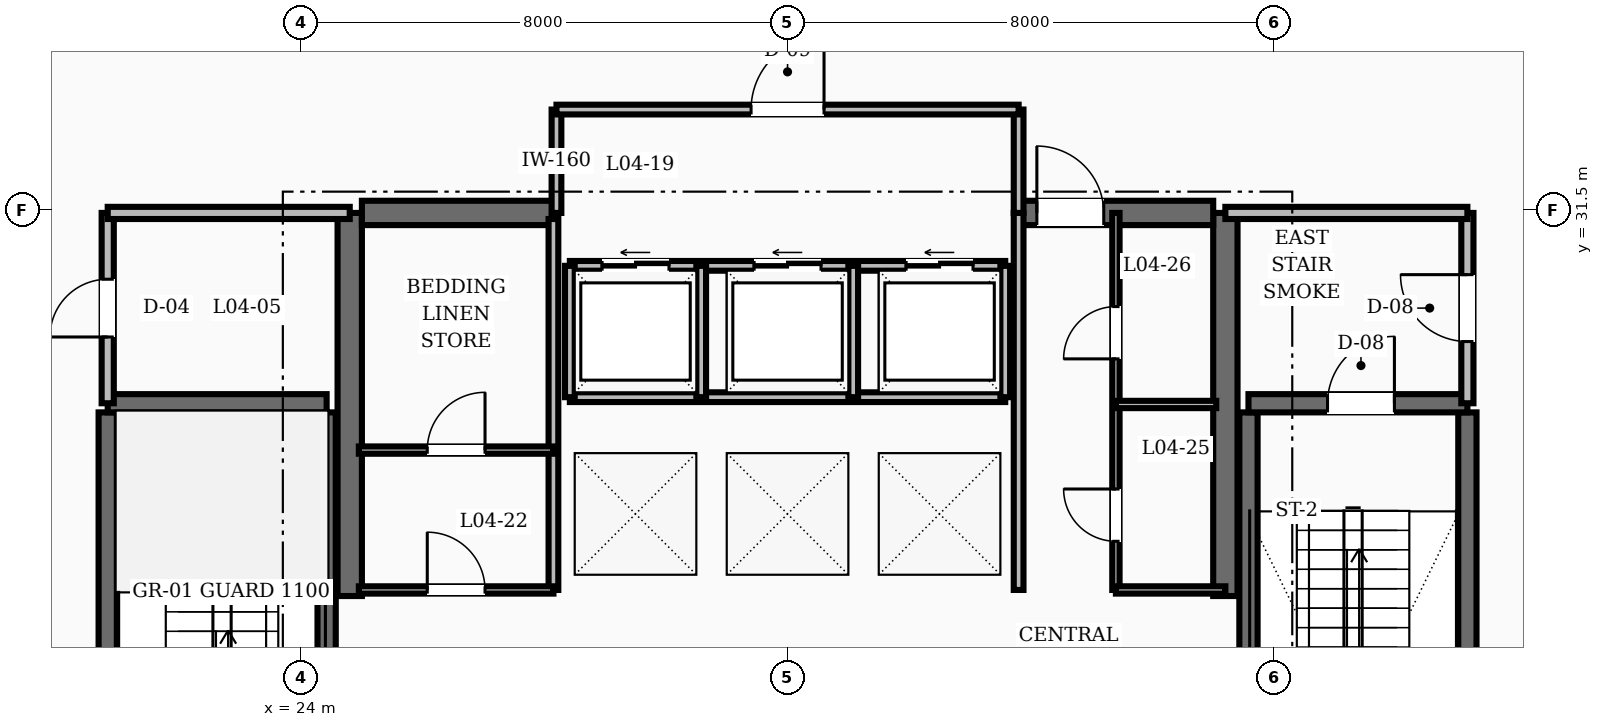
"""IFC4 building model, lengths in metres.
Left out: names, types, materials, properties, quantities, classifications, styles, units other than length and angle.
Written with IfcOpenShell. Run it as: python <this file> out.ifc"""

import sys

from ifc_helpers import new_model, si_unit, direction, frame, frame_2d, origin, place, context, subcontext, project, spatial, rectangle, extrude, element, fill, save


model = new_model("IFC4")
c1 = context("Model", 3, precision=1e-05, world=origin(), true_north=direction((0.0, 1.0)))
c2 = subcontext(c1, "Body", "Model", "MODEL_VIEW")
j1 = project(units=[si_unit("LENGTHUNIT", "METRE"), si_unit("PLANEANGLEUNIT", "RADIAN")], contexts=[c1])
p1 = place(None, origin())
s1 = spatial("IfcSite", under=j1, at=p1, CompositionType="ELEMENT")
p2 = place(p1, origin())
s2 = spatial("IfcBuilding", under=s1, at=p2, CompositionType="ELEMENT")
p3 = place(p2, frame((0.0, 0.0, 19.6)))
s3 = spatial("IfcBuildingStorey", under=s2, at=p3, CompositionType="ELEMENT", Elevation=19.6)
for number, where, z_axis, x_axis in (
    (1, (24.8, 25.15, 0.0), (0.0, 0.0, 1.0), (0.0, 1.0, 0.0)),
    (2, (39.2, 25.15, 0.0), (0.0, 0.0, 1.0), (0.0, 1.0, 0.0)),
):
    element("IfcWall", number, at=place(p3, frame(where, z_axis=z_axis, x_axis=x_axis)), inside=s3, PredefinedType="SHEAR", context=c2, shape_type="SweptSolid", body=[
        extrude(rectangle(XDim=6.3, YDim=0.4, at=frame_2d((3.15, 0.0))), origin(), (0.0, 0.0, 1.0), 4.8),
    ])
p4 = place(p3, frame((25.0, 31.45, 0.0), z_axis=(0.0, 0.0, 1.0), x_axis=(1.0, 0.0, 0.0)))
e3 = element("IfcWall", 3, at=p4, inside=s3, PredefinedType="SHEAR", context=c2, shape_type="SweptSolid", body=[
    extrude(rectangle(XDim=3.2, YDim=0.4, at=frame_2d((1.6, 0.0))), origin(), (0.0, 0.0, 1.0), 4.8),
])
p5 = place(p3, frame((35.8, 31.45, 0.0), z_axis=(0.0, 0.0, 1.0), x_axis=(1.0, 0.0, 0.0)))
e4 = element("IfcWall", 4, at=p5, inside=s3, PredefinedType="SHEAR", context=c2, shape_type="SweptSolid", body=[
    extrude(rectangle(XDim=3.2, YDim=0.4, at=frame_2d((1.6, 0.0))), origin(), (0.0, 0.0, 1.0), 4.8),
])
p6 = place(p5, frame((0.3, 0.0, 0.0)))
e5 = element("IfcOpeningElement", 5, at=p6, cuts=e4, PredefinedType="OPENING", context=c2, shape_type="SweptSolid", body=[
    extrude(rectangle(XDim=1.1, YDim=2.1, at=frame_2d((0.55, 1.05))), frame((0.0, 0.21, 0.0), z_axis=(0.0, -1.0, 0.0), x_axis=(1.0, 0.0, 0.0)), (0.0, 0.0, 1.0), 0.42),
])
for number, where, z_axis, x_axis in (
    (6, (20.82, 19.43, 0.0), (0.0, 0.0, 1.0), (0.0, 1.0, 0.0)),
    (7, (24.42, 19.43, 0.0), (0.0, 0.0, 1.0), (0.0, 1.0, 0.0)),
):
    element("IfcWall", number, at=place(p3, frame(where, z_axis=z_axis, x_axis=x_axis)), inside=s3, PredefinedType="SHEAR", context=c2, shape_type="SweptSolid", body=[
        extrude(rectangle(XDim=8.74, YDim=0.3, at=frame_2d((4.37, 0.0))), origin(), (0.0, 0.0, 1.0), 4.8),
    ])
p7 = place(p3, frame((20.82, 28.32, 0.0), z_axis=(0.0, 0.0, 1.0), x_axis=(1.0, 0.0, 0.0)))
e8 = element("IfcWall", 8, at=p7, inside=s3, PredefinedType="SHEAR", context=c2, shape_type="SweptSolid", body=[
    extrude(rectangle(XDim=3.6, YDim=0.3, at=frame_2d((1.8, 0.0))), origin(), (0.0, 0.0, 1.0), 4.8),
])
for number, where, z_axis, x_axis in (
    (9, (43.18, 19.43, 0.0), (0.0, 0.0, 1.0), (0.0, 1.0, 0.0)),
    (10, (39.58, 19.43, 0.0), (0.0, 0.0, 1.0), (0.0, 1.0, 0.0)),
):
    element("IfcWall", number, at=place(p3, frame(where, z_axis=z_axis, x_axis=x_axis)), inside=s3, PredefinedType="SHEAR", context=c2, shape_type="SweptSolid", body=[
        extrude(rectangle(XDim=8.74, YDim=0.3, at=frame_2d((4.37, 0.0))), origin(), (0.0, 0.0, 1.0), 4.8),
    ])
p8 = place(p3, frame((39.58, 28.32, 0.0), z_axis=(0.0, 0.0, 1.0), x_axis=(1.0, 0.0, 0.0)))
e11 = element("IfcWall", 11, at=p8, inside=s3, PredefinedType="SHEAR", context=c2, shape_type="SweptSolid", body=[
    extrude(rectangle(XDim=3.6, YDim=0.3, at=frame_2d((1.8, 0.0))), origin(), (0.0, 0.0, 1.0), 4.8),
])
p9 = place(p8, frame((1.3, 0.0, 0.0)))
e12 = element("IfcOpeningElement", 12, at=p9, cuts=e11, PredefinedType="OPENING", context=c2, shape_type="SweptSolid", body=[
    extrude(rectangle(XDim=1.1, YDim=2.1, at=frame_2d((0.55, 1.05))), frame((0.0, 0.16, 0.0), z_axis=(0.0, -1.0, 0.0), x_axis=(1.0, 0.0, 0.0)), (0.0, 0.0, 1.0), 0.32),
])
p10 = place(p3, frame((43.18, 28.32, 0.0), z_axis=(0.0, 0.0, 1.0), x_axis=(0.0, 1.0, 0.0)))
e13 = element("IfcWall", 13, at=p10, inside=s3, PredefinedType="SOLIDWALL", context=c2, shape_type="SweptSolid", body=[
    extrude(rectangle(XDim=3.13, YDim=0.2, at=frame_2d((1.565, 0.0))), origin(), (0.0, 0.0, 1.0), 3.42),
])
p11 = place(p10, frame((1.015, 0.0, 0.0)))
e14 = element("IfcOpeningElement", 14, at=p11, cuts=e13, PredefinedType="OPENING", context=c2, shape_type="SweptSolid", body=[
    extrude(rectangle(XDim=1.1, YDim=2.1, at=frame_2d((0.55, 1.05))), frame((0.0, 0.11, 0.0), z_axis=(0.0, -1.0, 0.0), x_axis=(1.0, 0.0, 0.0)), (0.0, 0.0, 1.0), 0.22),
])
p12 = place(p3, frame((39.2, 31.45, 0.0), z_axis=(0.0, 0.0, 1.0), x_axis=(1.0, 0.0, 0.0)))
e15 = element("IfcWall", 15, at=p12, inside=s3, PredefinedType="SOLIDWALL", context=c2, shape_type="SweptSolid", body=[
    extrude(rectangle(XDim=3.98, YDim=0.2, at=frame_2d((1.99, 0.0))), origin(), (0.0, 0.0, 1.0), 3.42),
])
p13 = place(p3, frame((20.82, 28.32, 0.0), z_axis=(0.0, 0.0, 1.0), x_axis=(0.0, 1.0, 0.0)))
e16 = element("IfcWall", 16, at=p13, inside=s3, PredefinedType="SOLIDWALL", context=c2, shape_type="SweptSolid", body=[
    extrude(rectangle(XDim=3.13, YDim=0.2, at=frame_2d((1.565, 0.0))), origin(), (0.0, 0.0, 1.0), 3.42),
])
p14 = place(p13, frame((1.09, 0.0, 0.0)))
e17 = element("IfcOpeningElement", 17, at=p14, cuts=e16, PredefinedType="OPENING", context=c2, shape_type="SweptSolid", body=[
    extrude(rectangle(XDim=0.95, YDim=2.1, at=frame_2d((0.475, 1.05))), frame((0.0, 0.11, 0.0), z_axis=(0.0, -1.0, 0.0), x_axis=(1.0, 0.0, 0.0)), (0.0, 0.0, 1.0), 0.22),
])
p15 = place(p3, frame((20.82, 31.45, 0.0), z_axis=(0.0, 0.0, 1.0), x_axis=(1.0, 0.0, 0.0)))
e18 = element("IfcWall", 18, at=p15, inside=s3, PredefinedType="SOLIDWALL", context=c2, shape_type="SweptSolid", body=[
    extrude(rectangle(XDim=3.98, YDim=0.2, at=frame_2d((1.99, 0.0))), origin(), (0.0, 0.0, 1.0), 3.42),
])
p16 = place(p3, frame((35.8, 25.25, 0.0), z_axis=(0.0, 0.0, 1.0), x_axis=(0.0, 1.0, 0.0)))
e19 = element("IfcWall", 19, at=p16, inside=s3, PredefinedType="SOLIDWALL", context=c2, shape_type="SweptSolid", body=[
    extrude(rectangle(XDim=6.2, YDim=0.16, at=frame_2d((3.1, 0.0))), origin(), (0.0, 0.0, 1.0), 3.42),
])
p17 = place(p3, frame((28.42, 30.58, 0.0), z_axis=(0.0, 0.0, 1.0), x_axis=(1.0, 0.0, 0.0)))
e20 = element("IfcWall", 20, at=p17, inside=s3, PredefinedType="SOLIDWALL", context=c2, shape_type="SweptSolid", body=[
    extrude(rectangle(XDim=7.16, YDim=0.16, at=frame_2d((3.58, 0.0))), origin(), (0.0, 0.0, 1.0), 3.42),
])
p18 = place(p17, frame((0.53, 0.0, 0.0)))
e21 = element("IfcOpeningElement", 21, at=p18, cuts=e20, PredefinedType="OPENING", context=c2, shape_type="SweptSolid", body=[
    extrude(rectangle(XDim=1.1, YDim=2.15, at=frame_2d((0.55, 1.075))), frame((0.0, 0.09, 0.0), z_axis=(0.0, -1.0, 0.0), x_axis=(1.0, 0.0, 0.0)), (0.0, 0.0, 1.0), 0.18),
])
p19 = place(p17, frame((3.03, 0.0, 0.0)))
e22 = element("IfcOpeningElement", 22, at=p19, cuts=e20, PredefinedType="OPENING", context=c2, shape_type="SweptSolid", body=[
    extrude(rectangle(XDim=1.1, YDim=2.15, at=frame_2d((0.55, 1.075))), frame((0.0, 0.09, 0.0), z_axis=(0.0, -1.0, 0.0), x_axis=(1.0, 0.0, 0.0)), (0.0, 0.0, 1.0), 0.18),
])
p20 = place(p17, frame((5.53, 0.0, 0.0)))
e23 = element("IfcOpeningElement", 23, at=p20, cuts=e20, PredefinedType="OPENING", context=c2, shape_type="SweptSolid", body=[
    extrude(rectangle(XDim=1.1, YDim=2.15, at=frame_2d((0.55, 1.075))), frame((0.0, 0.09, 0.0), z_axis=(0.0, -1.0, 0.0), x_axis=(1.0, 0.0, 0.0)), (0.0, 0.0, 1.0), 0.18),
])
p21 = place(p3, frame((28.42, 28.42, 0.0), z_axis=(0.0, 0.0, 1.0), x_axis=(1.0, 0.0, 0.0)))
e24 = element("IfcWall", 24, at=p21, inside=s3, PredefinedType="SOLIDWALL", context=c2, shape_type="SweptSolid", body=[
    extrude(rectangle(XDim=7.16, YDim=0.16, at=frame_2d((3.58, 0.0))), origin(), (0.0, 0.0, 1.0), 3.42),
])
for number, where, z_axis, x_axis in (
    (25, (28.42, 28.42, 0.0), (0.0, 0.0, 1.0), (0.0, 1.0, 0.0)),
    (26, (30.58, 28.42, 0.0), (0.0, 0.0, 1.0), (0.0, 1.0, 0.0)),
    (27, (33.08, 28.42, 0.0), (0.0, 0.0, 1.0), (0.0, 1.0, 0.0)),
    (28, (35.58, 28.42, 0.0), (0.0, 0.0, 1.0), (0.0, 1.0, 0.0)),
):
    element("IfcWall", number, at=place(p3, frame(where, z_axis=z_axis, x_axis=x_axis)), inside=s3, PredefinedType="SOLIDWALL", context=c2, shape_type="SweptSolid", body=[
        extrude(rectangle(XDim=2.16, YDim=0.16, at=frame_2d((1.08, 0.0))), origin(), (0.0, 0.0, 1.0), 3.42),
    ])
for number, where, z_axis, x_axis in (
    (29, (28.2, 31.45, 0.0), (0.0, 0.0, 1.0), (0.0, 1.0, 0.0)),
    (30, (35.8, 31.45, 0.0), (0.0, 0.0, 1.0), (0.0, 1.0, 0.0)),
):
    element("IfcWall", number, at=place(p3, frame(where, z_axis=z_axis, x_axis=x_axis)), inside=s3, PredefinedType="SOLIDWALL", context=c2, shape_type="SweptSolid", body=[
        extrude(rectangle(XDim=1.7, YDim=0.16, at=frame_2d((0.85, 0.0))), origin(), (0.0, 0.0, 1.0), 3.42),
    ])
p22 = place(p3, frame((28.2, 33.15, 0.0), z_axis=(0.0, 0.0, 1.0), x_axis=(1.0, 0.0, 0.0)))
e31 = element("IfcWall", 31, at=p22, inside=s3, PredefinedType="SOLIDWALL", context=c2, shape_type="SweptSolid", body=[
    extrude(rectangle(XDim=7.6, YDim=0.16, at=frame_2d((3.8, 0.0))), origin(), (0.0, 0.0, 1.0), 3.42),
])
p23 = place(p22, frame((3.2, 0.0, 0.0)))
e32 = element("IfcOpeningElement", 32, at=p23, cuts=e31, PredefinedType="OPENING", context=c2, shape_type="SweptSolid", body=[
    extrude(rectangle(XDim=1.2, YDim=2.1, at=frame_2d((0.6, 1.05))), frame((0.0, 0.09, 0.0), z_axis=(0.0, -1.0, 0.0), x_axis=(1.0, 0.0, 0.0)), (0.0, 0.0, 1.0), 0.18),
])
p24 = place(p3, frame((28.15, 25.25, 0.0), z_axis=(0.0, 0.0, 1.0), x_axis=(0.0, 1.0, 0.0)))
e33 = element("IfcWall", 33, at=p24, inside=s3, PredefinedType="SOLIDWALL", context=c2, shape_type="SweptSolid", body=[
    extrude(rectangle(XDim=6.1, YDim=0.16, at=frame_2d((3.05, 0.0))), origin(), (0.0, 0.0, 1.0), 3.42),
])
p25 = place(p3, frame((24.95, 25.25, 0.0), z_axis=(0.0, 0.0, 1.0), x_axis=(1.0, 0.0, 0.0)))
e34 = element("IfcWall", 34, at=p25, inside=s3, PredefinedType="PARTITIONING", context=c2, shape_type="SweptSolid", body=[
    extrude(rectangle(XDim=3.2, YDim=0.12, at=frame_2d((1.6, 0.0))), origin(), (0.0, 0.0, 1.0), 3.42),
])
p26 = place(p25, frame((1.125, 0.0, 0.0)))
e35 = element("IfcOpeningElement", 35, at=p26, cuts=e34, PredefinedType="OPENING", context=c2, shape_type="SweptSolid", body=[
    extrude(rectangle(XDim=0.95, YDim=2.1, at=frame_2d((0.475, 1.05))), frame((0.0, 0.07, 0.0), z_axis=(0.0, -1.0, 0.0), x_axis=(1.0, 0.0, 0.0)), (0.0, 0.0, 1.0), 0.14),
])
p27 = place(p3, frame((37.4, 25.25, 0.0), z_axis=(0.0, 0.0, 1.0), x_axis=(0.0, 1.0, 0.0)))
e36 = element("IfcWall", 36, at=p27, inside=s3, PredefinedType="PARTITIONING", context=c2, shape_type="SweptSolid", body=[
    extrude(rectangle(XDim=6.2, YDim=0.12, at=frame_2d((3.1, 0.0))), origin(), (0.0, 0.0, 1.0), 3.42),
])
p28 = place(p27, frame((0.8, 0.0, 0.0)))
e37 = element("IfcOpeningElement", 37, at=p28, cuts=e36, PredefinedType="OPENING", context=c2, shape_type="SweptSolid", body=[
    extrude(rectangle(XDim=0.86, YDim=2.1, at=frame_2d((0.43, 1.05))), frame((0.0, 0.07, 0.0), z_axis=(0.0, -1.0, 0.0), x_axis=(1.0, 0.0, 0.0)), (0.0, 0.0, 1.0), 0.14),
])
p29 = place(p27, frame((3.8, 0.0, 0.0)))
e38 = element("IfcOpeningElement", 38, at=p29, cuts=e36, PredefinedType="OPENING", context=c2, shape_type="SweptSolid", body=[
    extrude(rectangle(XDim=0.86, YDim=2.1, at=frame_2d((0.43, 1.05))), frame((0.0, 0.07, 0.0), z_axis=(0.0, -1.0, 0.0), x_axis=(1.0, 0.0, 0.0)), (0.0, 0.0, 1.0), 0.14),
])
p30 = place(p3, frame((37.4, 25.25, 0.0), z_axis=(0.0, 0.0, 1.0), x_axis=(1.0, 0.0, 0.0)))
e39 = element("IfcWall", 39, at=p30, inside=s3, PredefinedType="PARTITIONING", context=c2, shape_type="SweptSolid", body=[
    extrude(rectangle(XDim=1.8, YDim=0.12, at=frame_2d((0.9, 0.0))), origin(), (0.0, 0.0, 1.0), 3.42),
])
p31 = place(p3, frame((24.95, 27.55, 0.0), z_axis=(0.0, 0.0, 1.0), x_axis=(1.0, 0.0, 0.0)))
e40 = element("IfcWall", 40, at=p31, inside=s3, PredefinedType="PARTITIONING", context=c2, shape_type="SweptSolid", body=[
    extrude(rectangle(XDim=3.2, YDim=0.12, at=frame_2d((1.6, 0.0))), origin(), (0.0, 0.0, 1.0), 3.42),
])
p32 = place(p31, frame((1.125, 0.0, 0.0)))
e41 = element("IfcOpeningElement", 41, at=p32, cuts=e40, PredefinedType="OPENING", context=c2, shape_type="SweptSolid", body=[
    extrude(rectangle(XDim=0.95, YDim=2.1, at=frame_2d((0.475, 1.05))), frame((0.0, 0.07, 0.0), z_axis=(0.0, -1.0, 0.0), x_axis=(1.0, 0.0, 0.0)), (0.0, 0.0, 1.0), 0.14),
])
p33 = place(p3, frame((37.4, 28.3, 0.0), z_axis=(0.0, 0.0, 1.0), x_axis=(1.0, 0.0, 0.0)))
e42 = element("IfcWall", 42, at=p33, inside=s3, PredefinedType="PARTITIONING", context=c2, shape_type="SweptSolid", body=[
    extrude(rectangle(XDim=1.65, YDim=0.12, at=frame_2d((0.825, 0.0))), origin(), (0.0, 0.0, 1.0), 3.42),
])
p34 = place(p9, origin())
e43 = element("IfcDoor", 43, at=p34, inside=s3, OperationType="SINGLE_SWING_RIGHT", PredefinedType="DOOR", context=c2, shape_type="SweptSolid", body=[
    extrude(rectangle(XDim=1.1, YDim=2.1, at=frame_2d((0.55, 1.05))), frame((0.0, 0.025, 0.0), z_axis=(0.0, -1.0, 0.0), x_axis=(1.0, 0.0, 0.0)), (0.0, 0.0, 1.0), 0.05),
])
fill(e12, e43)
p35 = place(p11, origin())
e44 = element("IfcDoor", 44, at=p35, inside=s3, OperationType="SINGLE_SWING_RIGHT", PredefinedType="DOOR", context=c2, shape_type="SweptSolid", body=[
    extrude(rectangle(XDim=1.1, YDim=2.1, at=frame_2d((0.55, 1.05))), frame((0.0, 0.025, 0.0), z_axis=(0.0, -1.0, 0.0), x_axis=(1.0, 0.0, 0.0)), (0.0, 0.0, 1.0), 0.05),
])
fill(e14, e44)
p36 = place(p14, origin())
e45 = element("IfcDoor", 45, at=p36, inside=s3, OperationType="SINGLE_SWING_LEFT", PredefinedType="DOOR", context=c2, shape_type="SweptSolid", body=[
    extrude(rectangle(XDim=0.95, YDim=2.1, at=frame_2d((0.475, 1.05))), frame((0.0, 0.025, 0.0), z_axis=(0.0, -1.0, 0.0), x_axis=(1.0, 0.0, 0.0)), (0.0, 0.0, 1.0), 0.05),
])
fill(e17, e45)
p37 = place(p6, origin())
e46 = element("IfcDoor", 46, at=p37, inside=s3, OperationType="SINGLE_SWING_LEFT", PredefinedType="DOOR", context=c2, shape_type="SweptSolid", body=[
    extrude(rectangle(XDim=1.1, YDim=2.1, at=frame_2d((0.55, 1.05))), frame((0.0, 0.025, 0.0), z_axis=(0.0, -1.0, 0.0), x_axis=(1.0, 0.0, 0.0)), (0.0, 0.0, 1.0), 0.05),
])
fill(e5, e46)
p38 = place(p18, origin())
e47 = element("IfcDoor", 47, at=p38, inside=s3, OperationType="SLIDING_TO_LEFT", PredefinedType="DOOR", context=c2, shape_type="SweptSolid", body=[
    extrude(rectangle(XDim=1.1, YDim=2.15, at=frame_2d((0.55, 1.075))), frame((0.0, 0.025, 0.0), z_axis=(0.0, -1.0, 0.0), x_axis=(1.0, 0.0, 0.0)), (0.0, 0.0, 1.0), 0.05),
])
fill(e21, e47)
p39 = place(p19, origin())
e48 = element("IfcDoor", 48, at=p39, inside=s3, OperationType="SLIDING_TO_LEFT", PredefinedType="DOOR", context=c2, shape_type="SweptSolid", body=[
    extrude(rectangle(XDim=1.1, YDim=2.15, at=frame_2d((0.55, 1.075))), frame((0.0, 0.025, 0.0), z_axis=(0.0, -1.0, 0.0), x_axis=(1.0, 0.0, 0.0)), (0.0, 0.0, 1.0), 0.05),
])
fill(e22, e48)
p40 = place(p20, origin())
e49 = element("IfcDoor", 49, at=p40, inside=s3, OperationType="SLIDING_TO_LEFT", PredefinedType="DOOR", context=c2, shape_type="SweptSolid", body=[
    extrude(rectangle(XDim=1.1, YDim=2.15, at=frame_2d((0.55, 1.075))), frame((0.0, 0.025, 0.0), z_axis=(0.0, -1.0, 0.0), x_axis=(1.0, 0.0, 0.0)), (0.0, 0.0, 1.0), 0.05),
])
fill(e23, e49)
p41 = place(p23, origin())
e50 = element("IfcDoor", 50, at=p41, inside=s3, OperationType="SINGLE_SWING_RIGHT", PredefinedType="DOOR", context=c2, shape_type="SweptSolid", body=[
    extrude(rectangle(XDim=1.2, YDim=2.1, at=frame_2d((0.6, 1.05))), frame((0.0, 0.025, 0.0), z_axis=(0.0, -1.0, 0.0), x_axis=(1.0, 0.0, 0.0)), (0.0, 0.0, 1.0), 0.05),
])
fill(e32, e50)
p42 = place(p26, origin())
e51 = element("IfcDoor", 51, at=p42, inside=s3, OperationType="SINGLE_SWING_LEFT", PredefinedType="DOOR", context=c2, shape_type="SweptSolid", body=[
    extrude(rectangle(XDim=0.95, YDim=2.1, at=frame_2d((0.475, 1.05))), frame((0.0, 0.025, 0.0), z_axis=(0.0, -1.0, 0.0), x_axis=(1.0, 0.0, 0.0)), (0.0, 0.0, 1.0), 0.05),
])
fill(e35, e51)
p43 = place(p32, origin())
e52 = element("IfcDoor", 52, at=p43, inside=s3, OperationType="SINGLE_SWING_RIGHT", PredefinedType="DOOR", context=c2, shape_type="SweptSolid", body=[
    extrude(rectangle(XDim=0.95, YDim=2.1, at=frame_2d((0.475, 1.05))), frame((0.0, 0.025, 0.0), z_axis=(0.0, -1.0, 0.0), x_axis=(1.0, 0.0, 0.0)), (0.0, 0.0, 1.0), 0.05),
])
fill(e41, e52)
p44 = place(p28, origin())
e53 = element("IfcDoor", 53, at=p44, inside=s3, OperationType="SINGLE_SWING_RIGHT", PredefinedType="DOOR", context=c2, shape_type="SweptSolid", body=[
    extrude(rectangle(XDim=0.86, YDim=2.1, at=frame_2d((0.43, 1.05))), frame((0.0, 0.025, 0.0), z_axis=(0.0, -1.0, 0.0), x_axis=(1.0, 0.0, 0.0)), (0.0, 0.0, 1.0), 0.05),
])
fill(e37, e53)
p45 = place(p29, origin())
e54 = element("IfcDoor", 54, at=p45, inside=s3, OperationType="SINGLE_SWING_LEFT", PredefinedType="DOOR", context=c2, shape_type="SweptSolid", body=[
    extrude(rectangle(XDim=0.86, YDim=2.1, at=frame_2d((0.43, 1.05))), frame((0.0, 0.025, 0.0), z_axis=(0.0, -1.0, 0.0), x_axis=(1.0, 0.0, 0.0)), (0.0, 0.0, 1.0), 0.05),
])
fill(e38, e54)
save(model, sys.argv[1])
